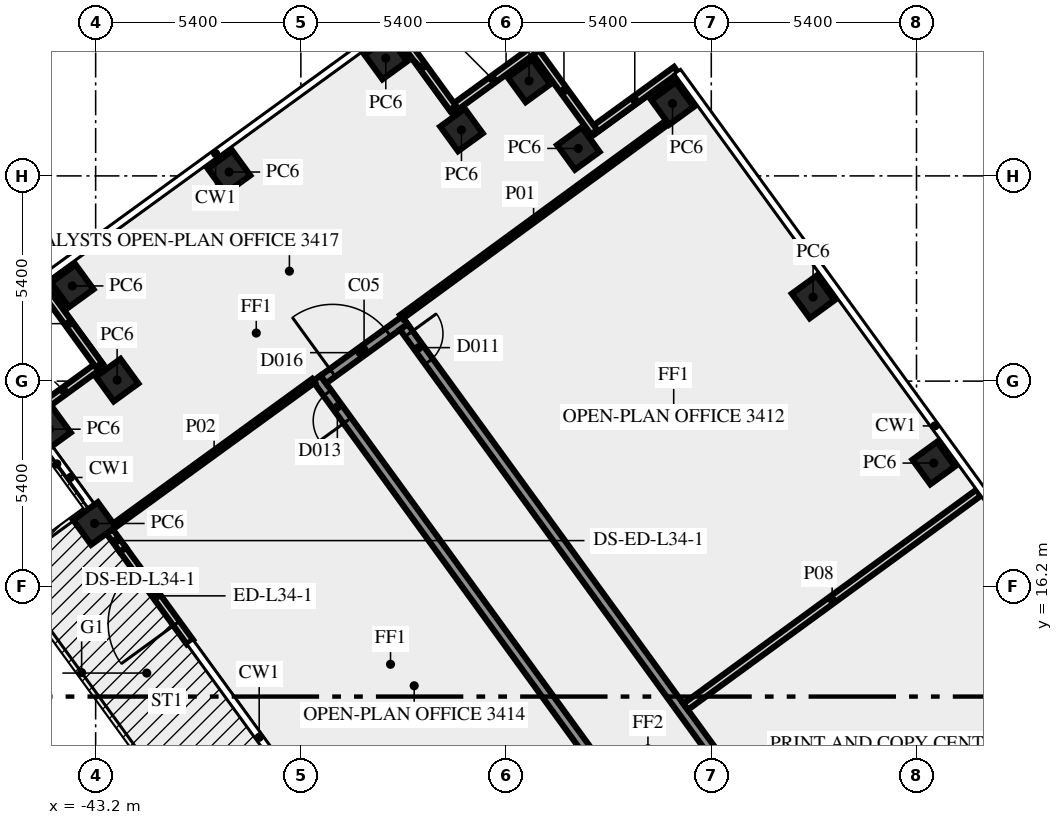
"""IFC4 building model, lengths in metres.
Left out: names, types, materials, properties, quantities, classifications, styles, units other than length and angle.
Written with IfcOpenShell. Run it as: python <this file> out.ifc"""

import sys

from ifc_helpers import new_model, si_unit, direction, frame, frame_2d, origin, origin_2d, place, context, subcontext, project, spatial, rectangle, extrude, element, fill, save


model = new_model("IFC4")
c1 = context("Model", 3, precision=1e-05, world=origin(), true_north=direction((0.0, 1.0)))
c2 = subcontext(c1, "Body", "Model", "MODEL_VIEW")
j1 = project(units=[si_unit("LENGTHUNIT", "METRE"), si_unit("PLANEANGLEUNIT", "RADIAN")], contexts=[c1])
p1 = place(None, origin())
s1 = spatial("IfcSite", under=j1, at=p1, CompositionType="ELEMENT")
p2 = place(p1, origin())
s2 = spatial("IfcBuilding", under=s1, at=p2, CompositionType="ELEMENT")
p3 = place(p2, frame((0.0, 0.0, 148.0)))
s3 = spatial("IfcBuildingStorey", under=s2, at=p3, CompositionType="ELEMENT", Elevation=148.0)
for number, where, z_axis, x_axis in (
    (1, (-21.147, 19.444, 0.0), (0.0, 0.0, 1.0), (-0.588, 0.809, 0.0)),
    (2, (-24.321, 23.812, 0.0), (0.0, 0.0, 1.0), (-0.588, 0.809, 0.0)),
    (3, (-28.02, 28.905, 0.0), (0.0, 0.0, 1.0), (-0.809, -0.588, 0.0)),
    (4, (-30.499, 27.723, 0.0), (0.0, 0.0, 1.0), (-0.809, -0.588, 0.0)),
    (5, (-31.795, 29.5, 0.0), (0.0, 0.0, 1.0), (-0.588, 0.809, 0.0)),
    (6, (-33.574, 28.209, 0.0), (0.0, 0.0, 1.0), (-0.588, 0.809, 0.0)),
    (7, (-35.565, 30.1, 0.0), (0.0, 0.0, 1.0), (-0.809, -0.588, 0.0)),
    (8, (-39.691, 27.102, 0.0), (0.0, 0.0, 1.0), (-0.809, -0.588, 0.0)),
    (9, (-43.815, 24.105, 0.0), (0.0, 0.0, 1.0), (-0.809, -0.588, 0.0)),
    (10, (-42.635, 21.626, 0.0), (0.0, 0.0, 1.0), (-0.809, -0.588, 0.0)),
    (11, (-44.415, 20.335, 0.0), (0.0, 0.0, 1.0), (0.588, -0.809, 0.0)),
    (12, (-43.231, 17.854, 0.0), (0.0, 0.0, 1.0), (0.588, -0.809, 0.0)),
):
    element("IfcColumn", number, at=place(p3, frame(where, z_axis=z_axis, x_axis=x_axis)), inside=s3, PredefinedType="COLUMN", context=c2, shape_type="SweptSolid", body=[
        extrude(rectangle(XDim=0.8, YDim=0.8, at=origin_2d()), origin(), (0.0, 0.0, 1.0), 3.65),
    ])
p4 = place(p3, frame((-43.061, 22.043, 0.0), z_axis=(0.0, 0.0, 1.0), x_axis=(-0.809026317077, -0.587772420479, 0.0)))
e13 = element("IfcWall", 13, at=p4, inside=s3, PredefinedType="SOLIDWALL", context=c2, shape_type="SweptSolid", body=[
    extrude(rectangle(XDim=2.4, YDim=0.2, at=frame_2d((1.2, 0.0))), origin(), (0.0, 0.0, 1.0), 3.65),
])
p5 = place(p3, frame((-40.719, 14.737, 0.0), z_axis=(0.0, 0.0, 1.0), x_axis=(-0.587808727036, 0.808999938455, 0.0)))
e14 = element("IfcWall", 14, at=p5, inside=s3, PredefinedType="SOLIDWALL", context=c2, shape_type="SweptSolid", body=[
    extrude(rectangle(XDim=3.0, YDim=0.2, at=frame_2d((1.5, 0.0))), origin(), (0.0, 0.0, 1.0), 3.65),
])
p6 = place(p5, frame((0.6, 0.0, 0.0)))
e15 = element("IfcOpeningElement", 15, at=p6, cuts=e14, PredefinedType="OPENING", context=c2, shape_type="SweptSolid", body=[
    extrude(rectangle(XDim=1.8, YDim=2.4, at=frame_2d((0.9, 1.2))), frame((0.0, 0.11, 0.0), z_axis=(0.0, -1.0, 0.0), x_axis=(1.0, 0.0, 0.0)), (0.0, 0.0, 1.0), 0.22),
])
for number, where, z_axis, x_axis in (
    (16, (-27.921, 29.787, 0.0), (0.0, 0.0, 1.0), (-0.809, -0.588, 0.0)),
    (17, (-30.083, 28.149, 0.0), (0.0, 0.0, 1.0), (-0.588, 0.809, 0.0)),
    (18, (-31.654, 30.331, 0.0), (0.0, 0.0, 1.0), (-0.809, -0.588, 0.0)),
    (19, (-33.801, 28.786, 0.0), (0.0, 0.0, 1.0), (-0.588, 0.809, 0.0)),
    (20, (-44.699, 24.205, 0.0), (0.0, 0.0, 1.0), (0.588, -0.809, 0.0)),
):
    element("IfcWall", number, at=place(p3, frame(where, z_axis=z_axis, x_axis=x_axis)), inside=s3, PredefinedType="SOLIDWALL", context=c2, shape_type="SweptSolid", body=[
        extrude(rectangle(XDim=2.7, YDim=0.2, at=frame_2d((1.35, 0.0))), origin(), (0.0, 0.0, 1.0), 3.65),
    ])
p7 = place(p3, frame((-20.531, -1.523, 0.0), z_axis=(0.0, 0.0, 1.0), x_axis=(-0.587785812891, 0.809016587076, 0.0)))
e21 = element("IfcWall", 21, at=p7, inside=s3, PredefinedType="SOLIDWALL", context=c2, shape_type="SweptSolid", body=[
    extrude(rectangle(XDim=28.67, YDim=0.25, at=frame_2d((14.335, 0.0))), origin(), (0.0, 0.0, 1.0), 3.65),
])
p8 = place(p7, frame((27.296, 0.0, 0.0)))
e22 = element("IfcOpeningElement", 22, at=p8, cuts=e21, PredefinedType="OPENING", context=c2, shape_type="SweptSolid", body=[
    extrude(rectangle(XDim=0.9, YDim=2.1, at=frame_2d((0.45, 1.05))), frame((0.0, 0.135, 0.0), z_axis=(0.0, -1.0, 0.0), x_axis=(1.0, 0.0, 0.0)), (0.0, 0.0, 1.0), 0.27),
])
p9 = place(p7, frame((11.866, 0.0, 0.0)))
e23 = element("IfcOpeningElement", 23, at=p9, cuts=e21, PredefinedType="OPENING", context=c2, shape_type="SweptSolid", body=[
    extrude(rectangle(XDim=0.9, YDim=2.1, at=frame_2d((0.45, 1.05))), frame((0.0, 0.135, 0.0), z_axis=(0.0, -1.0, 0.0), x_axis=(1.0, 0.0, 0.0)), (0.0, 0.0, 1.0), 0.27),
])
p10 = place(p7, frame((0.533, 0.0, 0.0)))
e24 = element("IfcOpeningElement", 24, at=p10, cuts=e21, PredefinedType="OPENING", context=c2, shape_type="SweptSolid", body=[
    extrude(rectangle(XDim=0.9, YDim=2.1, at=frame_2d((0.45, 1.05))), frame((0.0, 0.135, 0.0), z_axis=(0.0, -1.0, 0.0), x_axis=(1.0, 0.0, 0.0)), (0.0, 0.0, 1.0), 0.27),
])
p11 = place(p3, frame((-37.208, 21.644, 0.0), z_axis=(0.0, 0.0, 1.0), x_axis=(0.809038743598, 0.587755315891, 0.0)))
e25 = element("IfcWall", 25, at=p11, inside=s3, PredefinedType="SOLIDWALL", context=c2, shape_type="SweptSolid", body=[
    extrude(rectangle(XDim=2.65, YDim=0.25, at=frame_2d((1.325, 0.0))), origin(), (0.0, 0.0, 1.0), 3.65),
])
p12 = place(p11, frame((0.3, 0.0, 0.0)))
e26 = element("IfcOpeningElement", 26, at=p12, cuts=e25, PredefinedType="OPENING", context=c2, shape_type="SweptSolid", body=[
    extrude(rectangle(XDim=1.8, YDim=2.1, at=frame_2d((0.9, 1.05))), frame((0.0, 0.135, 0.0), z_axis=(0.0, -1.0, 0.0), x_axis=(1.0, 0.0, 0.0)), (0.0, 0.0, 1.0), 0.27),
])
p13 = place(p3, frame((-35.092, 23.027, 0.0), z_axis=(0.0, 0.0, 1.0), x_axis=(0.587784076945, -0.809017848313, 0.0)))
e27 = element("IfcWall", 27, at=p13, inside=s3, PredefinedType="SOLIDWALL", context=c2, shape_type="SweptSolid", body=[
    extrude(rectangle(XDim=29.853, YDim=0.25, at=frame_2d((14.927, 0.0))), origin(), (0.0, 0.0, 1.0), 3.65),
])
p14 = place(p13, frame((0.224, 0.0, 0.0)))
e28 = element("IfcOpeningElement", 28, at=p14, cuts=e27, PredefinedType="OPENING", context=c2, shape_type="SweptSolid", body=[
    extrude(rectangle(XDim=0.9, YDim=2.1, at=frame_2d((0.45, 1.05))), frame((0.0, 0.135, 0.0), z_axis=(0.0, -1.0, 0.0), x_axis=(1.0, 0.0, 0.0)), (0.0, 0.0, 1.0), 0.27),
])
p15 = place(p13, frame((25.512, 0.0, 0.0)))
e29 = element("IfcOpeningElement", 29, at=p15, cuts=e27, PredefinedType="OPENING", context=c2, shape_type="SweptSolid", body=[
    extrude(rectangle(XDim=0.9, YDim=2.1, at=frame_2d((0.45, 1.05))), frame((0.0, 0.135, 0.0), z_axis=(0.0, -1.0, 0.0), x_axis=(1.0, 0.0, 0.0)), (0.0, 0.0, 1.0), 0.27),
])
p16 = place(p3, frame((-35.154, 23.291, 0.0), z_axis=(0.0, 0.0, 1.0), x_axis=(0.807000694978, 0.590550487516, 0.0)))
e30 = element("IfcWall", 30, at=p16, inside=s3, PredefinedType="PARTITIONING", context=c2, shape_type="SweptSolid", body=[
    extrude(rectangle(XDim=8.62, YDim=0.12, at=frame_2d((4.31, 0.0))), origin(), (0.0, 0.0, 1.0), 3.65),
])
p17 = place(p3, frame((-42.698, 17.81, 0.0), z_axis=(0.0, 0.0, 1.0), x_axis=(0.80901688725, 0.587785399737, 0.0)))
e31 = element("IfcWall", 31, at=p17, inside=s3, PredefinedType="PARTITIONING", context=c2, shape_type="SweptSolid", body=[
    extrude(rectangle(XDim=6.465, YDim=0.12, at=frame_2d((3.232, 0.0))), origin(), (0.0, 0.0, 1.0), 3.65),
])
p18 = place(p3, frame((-27.676, 13.032, 0.0), z_axis=(0.0, 0.0, 1.0), x_axis=(0.807606997933, 0.589721067023, 0.0)))
e32 = element("IfcWall", 32, at=p18, inside=s3, PredefinedType="SOLIDWALL", context=c2, shape_type="SweptSolid", body=[
    extrude(rectangle(XDim=9.55, YDim=0.2, at=frame_2d((4.775, 0.0))), origin(), (0.0, 0.0, 1.0), 2.85),
])
p19 = place(p3, frame((-42.482, 17.164, 0.0), z_axis=(0.0, 0.0, 1.0), x_axis=(-0.5878294574, 0.808984875639, 0.0)))
e33 = element("IfcWall", 33, at=p19, inside=s3, PredefinedType="SOLIDWALL", context=c2, shape_type="SweptSolid", body=[
    extrude(rectangle(XDim=0.594, YDim=0.2, at=frame_2d((0.297, 0.0))), origin(), (0.0, 0.0, 1.0), 3.65),
])
p20 = place(p6, origin())
e34 = element("IfcDoor", 34, at=p20, inside=s3, OperationType="DOUBLE_DOOR_SINGLE_SWING", PredefinedType="DOOR", context=c2, shape_type="SweptSolid", body=[
    extrude(rectangle(XDim=1.8, YDim=2.4, at=frame_2d((0.9, 1.2))), frame((0.0, 0.025, 0.0), z_axis=(0.0, -1.0, 0.0), x_axis=(1.0, 0.0, 0.0)), (0.0, 0.0, 1.0), 0.05),
])
fill(e15, e34)
p21 = place(p12, origin())
e35 = element("IfcDoor", 35, at=p21, inside=s3, OperationType="DOUBLE_DOOR_SINGLE_SWING", PredefinedType="DOOR", context=c2, shape_type="SweptSolid", body=[
    extrude(rectangle(XDim=1.8, YDim=2.1, at=frame_2d((0.9, 1.05))), frame((0.0, 0.025, 0.0), z_axis=(0.0, -1.0, 0.0), x_axis=(1.0, 0.0, 0.0)), (0.0, 0.0, 1.0), 0.05),
])
fill(e26, e35)
p22 = place(p14, origin())
e36 = element("IfcDoor", 36, at=p22, inside=s3, OperationType="SINGLE_SWING_LEFT", PredefinedType="DOOR", context=c2, shape_type="SweptSolid", body=[
    extrude(rectangle(XDim=0.9, YDim=2.1, at=frame_2d((0.45, 1.05))), frame((0.0, 0.025, 0.0), z_axis=(0.0, -1.0, 0.0), x_axis=(1.0, 0.0, 0.0)), (0.0, 0.0, 1.0), 0.05),
])
fill(e28, e36)
p23 = place(p8, origin())
e37 = element("IfcDoor", 37, at=p23, inside=s3, OperationType="SINGLE_SWING_RIGHT", PredefinedType="DOOR", context=c2, shape_type="SweptSolid", body=[
    extrude(rectangle(XDim=0.9, YDim=2.1, at=frame_2d((0.45, 1.05))), frame((0.0, 0.025, 0.0), z_axis=(0.0, -1.0, 0.0), x_axis=(1.0, 0.0, 0.0)), (0.0, 0.0, 1.0), 0.05),
])
fill(e22, e37)
save(model, sys.argv[1])
